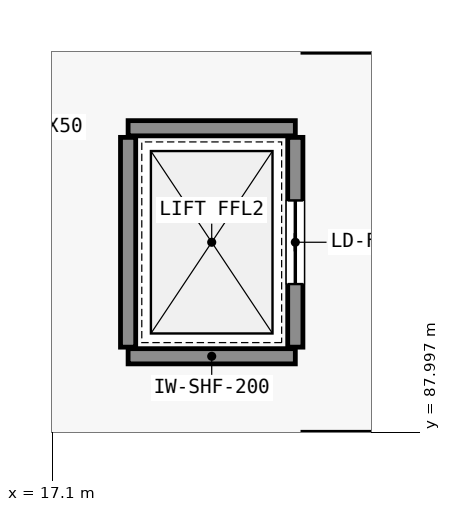
"""IFC4 building model, lengths in metres.
Left out: names, types, materials, properties, quantities, classifications, styles, units other than length and angle.
Written with IfcOpenShell. Run it as: python <this file> out.ifc"""

import sys

from ifc_helpers import new_model, si_unit, direction, frame, frame_2d, origin, place, context, subcontext, project, spatial, rectangle, extrude, element, fill, save


model = new_model("IFC4")
c1 = context("Model", 3, precision=1e-05, world=origin(), true_north=direction((0.0, 1.0)))
c2 = subcontext(c1, "Body", "Model", "MODEL_VIEW")
j1 = project(units=[si_unit("LENGTHUNIT", "METRE"), si_unit("PLANEANGLEUNIT", "RADIAN")], contexts=[c1])
p1 = place(None, origin())
s1 = spatial("IfcSite", under=j1, at=p1, CompositionType="ELEMENT")
p2 = place(p1, origin())
s2 = spatial("IfcBuilding", under=s1, at=p2, CompositionType="ELEMENT")
p3 = place(p2, frame((0.0, 0.0, 6.0)))
s3 = spatial("IfcBuildingStorey", under=s2, at=p3, CompositionType="ELEMENT", Elevation=6.0)
for number, where, z_axis, x_axis in (
    (1, (18.1, 89.0, 0.0), (0.0, 0.0, 1.0), (1.0, 0.0, 0.0)),
    (2, (18.1, 92.0, 0.0), (0.0, 0.0, 1.0), (1.0, 0.0, 0.0)),
):
    element("IfcWall", number, at=place(p3, frame(where, z_axis=z_axis, x_axis=x_axis)), inside=s3, PredefinedType="STANDARD", context=c2, shape_type="SweptSolid", body=[
        extrude(rectangle(XDim=2.2, YDim=0.2, at=frame_2d((1.1, 0.0))), origin(), (0.0, 0.0, 1.0), 5.04),
    ])
p4 = place(p3, frame((18.1, 89.12, 0.0), z_axis=(0.0, 0.0, 1.0), x_axis=(0.0, 1.0, 0.0)))
e3 = element("IfcWall", 3, at=p4, inside=s3, PredefinedType="STANDARD", context=c2, shape_type="SweptSolid", body=[
    extrude(rectangle(XDim=2.76, YDim=0.2, at=frame_2d((1.38, 0.0))), origin(), (0.0, 0.0, 1.0), 5.04),
])
p5 = place(p3, frame((20.3, 89.12, 0.0), z_axis=(0.0, 0.0, 1.0), x_axis=(0.0, 1.0, 0.0)))
e4 = element("IfcWall", 4, at=p5, inside=s3, PredefinedType="STANDARD", context=c2, shape_type="SweptSolid", body=[
    extrude(rectangle(XDim=2.76, YDim=0.2, at=frame_2d((1.38, 0.0))), origin(), (0.0, 0.0, 1.0), 5.04),
])
p6 = place(p5, frame((0.83, 0.0, 0.0)))
e5 = element("IfcOpeningElement", 5, at=p6, cuts=e4, PredefinedType="OPENING", context=c2, shape_type="SweptSolid", body=[
    extrude(rectangle(XDim=1.1, YDim=2.15, at=frame_2d((0.55, 1.075))), frame((0.0, 0.11, 0.0), z_axis=(0.0, -1.0, 0.0), x_axis=(1.0, 0.0, 0.0)), (0.0, 0.0, 1.0), 0.22),
])
p7 = place(p6, origin())
e6 = element("IfcDoor", 6, at=p7, inside=s3, OperationType="SLIDING_TO_LEFT", PredefinedType="DOOR", context=c2, shape_type="SweptSolid", body=[
    extrude(rectangle(XDim=1.1, YDim=2.15, at=frame_2d((0.55, 1.075))), frame((0.0, 0.025, 0.0), z_axis=(0.0, -1.0, 0.0), x_axis=(1.0, 0.0, 0.0)), (0.0, 0.0, 1.0), 0.05),
])
fill(e5, e6)
save(model, sys.argv[1])
